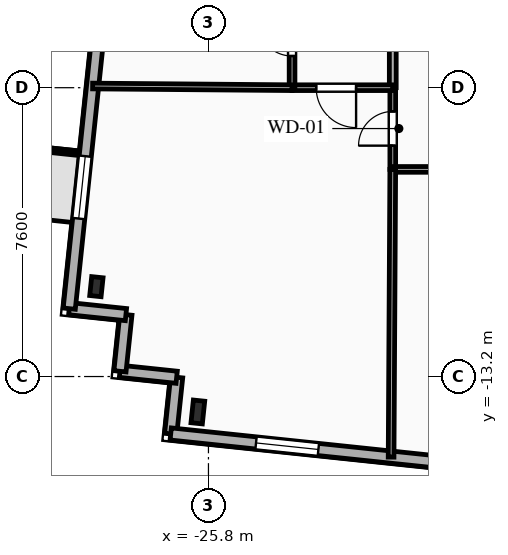
"""IFC4 building model, lengths in metres.
Left out: names, types, materials, properties, quantities, classifications, styles, units other than length and angle.
Written with IfcOpenShell. Run it as: python <this file> out.ifc"""

import sys

from ifc_helpers import new_model, si_unit, direction, frame, frame_2d, origin, origin_2d, place, context, subcontext, project, spatial, rectangle, i_section, extrude, element, fill, save


model = new_model("IFC4")
c1 = context("Model", 3, precision=1e-05, world=origin(), true_north=direction((0.0, 1.0)))
c2 = subcontext(c1, "Body", "Model", "MODEL_VIEW")
j1 = project(units=[si_unit("LENGTHUNIT", "METRE"), si_unit("PLANEANGLEUNIT", "RADIAN")], contexts=[c1])
p1 = place(None, origin())
s1 = spatial("IfcSite", under=j1, at=p1, CompositionType="ELEMENT")
p2 = place(p1, origin())
s2 = spatial("IfcBuilding", under=s1, at=p2, CompositionType="ELEMENT")
p3 = place(p2, frame((0.0, 0.0, 186.35)))
s3 = spatial("IfcBuildingStorey", under=s2, at=p3, CompositionType="ELEMENT", Elevation=186.35)
p4 = place(p3, frame((-26.079, -14.133, 0.0), z_axis=(0.0, 0.0, 1.0), x_axis=(0.994521895368, -0.104528463268, 0.0)))
e1 = element("IfcColumn", 1, at=p4, inside=s3, PredefinedType="COLUMN", context=c2, shape_type="SweptSolid", body=[
    extrude(i_section(OverallWidth=0.3, OverallDepth=0.6, WebThickness=0.015, FlangeThickness=0.03, FilletRadius=0.027, at=origin_2d()), origin(), (0.0, 0.0, 1.0), 3.35),
])
p5 = place(p3, frame((-28.749, -10.835, 0.0), z_axis=(0.0, 0.0, 1.0), x_axis=(0.994521895368, -0.104528463268, 0.0)))
e2 = element("IfcColumn", 2, at=p5, inside=s3, PredefinedType="COLUMN", context=c2, shape_type="SweptSolid", body=[
    extrude(i_section(OverallWidth=0.3, OverallDepth=0.5, WebThickness=0.014, FlangeThickness=0.028, FilletRadius=0.027, at=origin_2d()), origin(), (0.0, 0.0, 1.0), 3.35),
])
for number, where, z_axis, x_axis in (
    (3, (-26.793, -14.711, 0.0), (0.0, 0.0, 1.0), (0.104, 0.995, 0.0)),
    (4, (-26.637, -13.219, 0.0), (0.0, 0.0, 1.0), (-0.995, 0.104, 0.0)),
):
    element("IfcWall", number, at=place(p3, frame(where, z_axis=z_axis, x_axis=x_axis)), inside=s3, PredefinedType="SOLIDWALL", context=c2, shape_type="SweptSolid", body=[
        extrude(rectangle(XDim=1.5, YDim=0.32, at=frame_2d((0.75, 0.0))), origin(), (0.0, 0.0, 1.0), 3.04),
    ])
p6 = place(p3, frame((-28.128, -13.062, 0.0), z_axis=(0.0, 0.0, 1.0), x_axis=(0.104481464157, 0.994526834051, 0.0)))
e5 = element("IfcWall", 5, at=p6, inside=s3, PredefinedType="SOLIDWALL", context=c2, shape_type="SweptSolid", body=[
    extrude(rectangle(XDim=1.5, YDim=0.32, at=frame_2d((0.75, 0.0))), origin(), (0.0, 0.0, 1.0), 3.04),
])
p7 = place(p3, frame((-27.972, -11.571, 0.0), z_axis=(0.0, 0.0, 1.0), x_axis=(-0.994525057048, 0.104498377516, 0.0)))
e6 = element("IfcWall", 6, at=p7, inside=s3, PredefinedType="SOLIDWALL", context=c2, shape_type="SweptSolid", body=[
    extrude(rectangle(XDim=1.5, YDim=0.32, at=frame_2d((0.75, 0.0))), origin(), (0.0, 0.0, 1.0), 3.04),
])
p8 = place(p3, frame((-29.463, -11.414, 0.0), z_axis=(0.0, 0.0, 1.0), x_axis=(0.104530779244, 0.994521651947, 0.0)))
e7 = element("IfcWall", 7, at=p8, inside=s3, PredefinedType="SOLIDWALL", context=c2, shape_type="SweptSolid", body=[
    extrude(rectangle(XDim=28.8, YDim=0.32, at=frame_2d((14.4, 0.0))), origin(), (0.0, 0.0, 1.0), 3.04),
])
p9 = place(p8, frame((2.384, 0.0, 0.85)))
e8 = element("IfcOpeningElement", 8, at=p9, cuts=e7, PredefinedType="OPENING", context=c2, shape_type="SweptSolid", body=[
    extrude(rectangle(XDim=1.65, YDim=1.85, at=frame_2d((0.825, 0.925))), frame((0.0, 0.17, 0.0), z_axis=(0.0, -1.0, 0.0), x_axis=(1.0, 0.0, 0.0)), (0.0, 0.0, 1.0), 0.34),
])
p10 = place(p8, frame((8.973, 0.0, 0.85)))
e9 = element("IfcOpeningElement", 9, at=p10, cuts=e7, PredefinedType="OPENING", context=c2, shape_type="SweptSolid", body=[
    extrude(rectangle(XDim=1.95, YDim=1.85, at=frame_2d((0.975, 0.925))), frame((0.0, 0.17, 0.0), z_axis=(0.0, -1.0, 0.0), x_axis=(1.0, 0.0, 0.0)), (0.0, 0.0, 1.0), 0.34),
])
p11 = place(p8, frame((12.286, 0.0, 0.85)))
e10 = element("IfcOpeningElement", 10, at=p11, cuts=e7, PredefinedType="OPENING", context=c2, shape_type="SweptSolid", body=[
    extrude(rectangle(XDim=1.5, YDim=1.85, at=frame_2d((0.75, 0.925))), frame((0.0, 0.17, 0.0), z_axis=(0.0, -1.0, 0.0), x_axis=(1.0, 0.0, 0.0)), (0.0, 0.0, 1.0), 0.34),
])
p12 = place(p8, frame((15.094, 0.0, 0.85)))
e11 = element("IfcOpeningElement", 11, at=p12, cuts=e7, PredefinedType="OPENING", context=c2, shape_type="SweptSolid", body=[
    extrude(rectangle(XDim=1.5, YDim=1.85, at=frame_2d((0.75, 0.925))), frame((0.0, 0.17, 0.0), z_axis=(0.0, -1.0, 0.0), x_axis=(1.0, 0.0, 0.0)), (0.0, 0.0, 1.0), 0.34),
])
p13 = place(p8, frame((17.942, 0.0, 0.85)))
e12 = element("IfcOpeningElement", 12, at=p13, cuts=e7, PredefinedType="OPENING", context=c2, shape_type="SweptSolid", body=[
    extrude(rectangle(XDim=1.5, YDim=1.85, at=frame_2d((0.75, 0.925))), frame((0.0, 0.17, 0.0), z_axis=(0.0, -1.0, 0.0), x_axis=(1.0, 0.0, 0.0)), (0.0, 0.0, 1.0), 0.34),
])
p14 = place(p8, frame((23.442, 0.0, 0.85)))
e13 = element("IfcOpeningElement", 13, at=p14, cuts=e7, PredefinedType="OPENING", context=c2, shape_type="SweptSolid", body=[
    extrude(rectangle(XDim=1.65, YDim=1.85, at=frame_2d((0.825, 0.925))), frame((0.0, 0.17, 0.0), z_axis=(0.0, -1.0, 0.0), x_axis=(1.0, 0.0, 0.0)), (0.0, 0.0, 1.0), 0.34),
])
p15 = place(p3, frame((18.756, -19.498, 0.0), z_axis=(0.0, 0.0, 1.0), x_axis=(-0.994522060044, 0.104526896475, 0.0)))
e14 = element("IfcWall", 14, at=p15, inside=s3, PredefinedType="SOLIDWALL", context=c2, shape_type="SweptSolid", body=[
    extrude(rectangle(XDim=45.8, YDim=0.32, at=frame_2d((22.9, 0.0))), origin(), (0.0, 0.0, 1.0), 3.04),
])
p16 = place(p15, frame((1.217, 0.0, 0.85)))
e15 = element("IfcOpeningElement", 15, at=p16, cuts=e14, PredefinedType="OPENING", context=c2, shape_type="SweptSolid", body=[
    extrude(rectangle(XDim=1.65, YDim=1.85, at=frame_2d((0.825, 0.925))), frame((0.0, 0.17, 0.0), z_axis=(0.0, -1.0, 0.0), x_axis=(1.0, 0.0, 0.0)), (0.0, 0.0, 1.0), 0.34),
])
p17 = place(p15, frame((5.621, 0.0, 0.85)))
e16 = element("IfcOpeningElement", 16, at=p17, cuts=e14, PredefinedType="OPENING", context=c2, shape_type="SweptSolid", body=[
    extrude(rectangle(XDim=1.65, YDim=1.85, at=frame_2d((0.825, 0.925))), frame((0.0, 0.17, 0.0), z_axis=(0.0, -1.0, 0.0), x_axis=(1.0, 0.0, 0.0)), (0.0, 0.0, 1.0), 0.34),
])
p18 = place(p15, frame((13.433, 0.0, 0.85)))
e17 = element("IfcOpeningElement", 17, at=p18, cuts=e14, PredefinedType="OPENING", context=c2, shape_type="SweptSolid", body=[
    extrude(rectangle(XDim=2.2, YDim=1.85, at=frame_2d((1.1, 0.925))), frame((0.0, 0.17, 0.0), z_axis=(0.0, -1.0, 0.0), x_axis=(1.0, 0.0, 0.0)), (0.0, 0.0, 1.0), 0.34),
])
p19 = place(p15, frame((23.962, 0.0, 0.85)))
e18 = element("IfcOpeningElement", 18, at=p19, cuts=e14, PredefinedType="OPENING", context=c2, shape_type="SweptSolid", body=[
    extrude(rectangle(XDim=2.2, YDim=1.85, at=frame_2d((1.1, 0.925))), frame((0.0, 0.17, 0.0), z_axis=(0.0, -1.0, 0.0), x_axis=(1.0, 0.0, 0.0)), (0.0, 0.0, 1.0), 0.34),
])
p20 = place(p15, frame((34.366, 0.0, 0.85)))
e19 = element("IfcOpeningElement", 19, at=p20, cuts=e14, PredefinedType="OPENING", context=c2, shape_type="SweptSolid", body=[
    extrude(rectangle(XDim=1.65, YDim=1.85, at=frame_2d((0.825, 0.925))), frame((0.0, 0.17, 0.0), z_axis=(0.0, -1.0, 0.0), x_axis=(1.0, 0.0, 0.0)), (0.0, 0.0, 1.0), 0.34),
])
p21 = place(p15, frame((41.892, 0.0, 0.85)))
e20 = element("IfcOpeningElement", 20, at=p21, cuts=e14, PredefinedType="OPENING", context=c2, shape_type="SweptSolid", body=[
    extrude(rectangle(XDim=1.65, YDim=1.85, at=frame_2d((0.825, 0.925))), frame((0.0, 0.17, 0.0), z_axis=(0.0, -1.0, 0.0), x_axis=(1.0, 0.0, 0.0)), (0.0, 0.0, 1.0), 0.34),
])
p22 = place(p3, frame((-20.95, -7.75, 0.0), z_axis=(0.0, 0.0, 1.0), x_axis=(0.0, 1.0, 0.0)))
e21 = element("IfcWall", 21, at=p22, inside=s3, PredefinedType="PARTITIONING", context=c2, shape_type="SweptSolid", body=[
    extrude(rectangle(XDim=2.15, YDim=0.15, at=frame_2d((1.075, 0.0))), origin(), (0.0, 0.0, 1.0), 3.04),
])
p23 = place(p22, frame((0.625, 0.0, 0.0)))
e22 = element("IfcOpeningElement", 22, at=p23, cuts=e21, PredefinedType="OPENING", context=c2, shape_type="SweptSolid", body=[
    extrude(rectangle(XDim=0.9, YDim=2.1, at=frame_2d((0.45, 1.05))), frame((0.0, 0.085, 0.0), z_axis=(0.0, -1.0, 0.0), x_axis=(1.0, 0.0, 0.0)), (0.0, 0.0, 1.0), 0.17),
])
p24 = place(p3, frame((-11.325, -7.75, 0.0), z_axis=(0.0, 0.0, 1.0), x_axis=(-1.0, 0.0, 0.0)))
e23 = element("IfcWall", 23, at=p24, inside=s3, PredefinedType="PARTITIONING", context=c2, shape_type="SweptSolid", body=[
    extrude(rectangle(XDim=9.625, YDim=0.15, at=frame_2d((4.812, 0.0))), origin(), (0.0, 0.0, 1.0), 3.04),
])
p25 = place(p24, frame((2.434, 0.0, 0.0)))
e24 = element("IfcOpeningElement", 24, at=p25, cuts=e23, PredefinedType="OPENING", context=c2, shape_type="SweptSolid", body=[
    extrude(rectangle(XDim=1.05, YDim=2.15, at=frame_2d((0.525, 1.075))), frame((0.0, 0.085, 0.0), z_axis=(0.0, -1.0, 0.0), x_axis=(1.0, 0.0, 0.0)), (0.0, 0.0, 1.0), 0.17),
])
p26 = place(p3, frame((-20.95, -5.6, 0.0), z_axis=(0.0, 0.0, 1.0), x_axis=(0.0, 1.0, 0.0)))
e25 = element("IfcWall", 25, at=p26, inside=s3, PredefinedType="PARTITIONING", context=c2, shape_type="SweptSolid", body=[
    extrude(rectangle(XDim=14.1, YDim=0.18, at=frame_2d((7.05, 0.0))), origin(), (0.0, 0.0, 1.0), 3.04),
])
p27 = place(p26, frame((5.058, 0.0, 0.0)))
e26 = element("IfcOpeningElement", 26, at=p27, cuts=e25, PredefinedType="OPENING", context=c2, shape_type="SweptSolid", body=[
    extrude(rectangle(XDim=1.0, YDim=2.15, at=frame_2d((0.5, 1.075))), frame((0.0, 0.1, 0.0), z_axis=(0.0, -1.0, 0.0), x_axis=(1.0, 0.0, 0.0)), (0.0, 0.0, 1.0), 0.2),
])
p28 = place(p3, frame((-20.95, -5.6, 0.0), z_axis=(0.0, 0.0, 1.0), x_axis=(-1.0, 0.0, 0.0)))
e27 = element("IfcWall", 27, at=p28, inside=s3, PredefinedType="PARTITIONING", context=c2, shape_type="SweptSolid", body=[
    extrude(rectangle(XDim=2.65, YDim=0.15, at=frame_2d((1.325, 0.0))), origin(), (0.0, 0.0, 1.0), 3.04),
])
p29 = place(p28, frame((0.965, 0.0, 0.0)))
e28 = element("IfcOpeningElement", 28, at=p29, cuts=e27, PredefinedType="OPENING", context=c2, shape_type="SweptSolid", body=[
    extrude(rectangle(XDim=1.05, YDim=2.15, at=frame_2d((0.525, 1.075))), frame((0.0, 0.085, 0.0), z_axis=(0.0, -1.0, 0.0), x_axis=(1.0, 0.0, 0.0)), (0.0, 0.0, 1.0), 0.17),
])
p30 = place(p3, frame((-23.6, -5.6, 0.0), z_axis=(0.0, 0.0, 1.0), x_axis=(0.0, 1.0, 0.0)))
e29 = element("IfcWall", 29, at=p30, inside=s3, PredefinedType="PLUMBINGWALL", context=c2, shape_type="SweptSolid", body=[
    extrude(rectangle(XDim=2.35, YDim=0.15, at=frame_2d((1.175, 0.0))), origin(), (0.0, 0.0, 1.0), 2.695),
])
p31 = place(p30, frame((0.834, 0.0, 0.0)))
e30 = element("IfcOpeningElement", 30, at=p31, cuts=e29, PredefinedType="OPENING", context=c2, shape_type="SweptSolid", body=[
    extrude(rectangle(XDim=0.9, YDim=2.1, at=frame_2d((0.45, 1.05))), frame((0.0, 0.085, 0.0), z_axis=(0.0, -1.0, 0.0), x_axis=(1.0, 0.0, 0.0)), (0.0, 0.0, 1.0), 0.17),
])
p32 = place(p3, frame((-28.848, -5.556, 0.0), z_axis=(0.0, 0.0, 1.0), x_axis=(0.999964936305, -0.008374136435, 0.0)))
e31 = element("IfcWall", 31, at=p32, inside=s3, PredefinedType="PLUMBINGWALL", context=c2, shape_type="SweptSolid", body=[
    extrude(rectangle(XDim=5.248, YDim=0.15, at=frame_2d((2.624, 0.0))), origin(), (0.0, 0.0, 1.0), 3.04),
])
p33 = place(p3, frame((-20.95, -7.75, 0.0), z_axis=(0.0, 0.0, 1.0), x_axis=(-0.005804668564, -0.99998315277, 0.0)))
e32 = element("IfcWall", 32, at=p33, inside=s3, PredefinedType="PARTITIONING", context=c2, shape_type="SweptSolid", body=[
    extrude(rectangle(XDim=7.571, YDim=0.15, at=frame_2d((3.785, 0.0))), origin(), (0.0, 0.0, 1.0), 3.04),
])
p34 = place(p9, origin())
e33 = element("IfcWindow", 33, at=p34, inside=s3, PartitioningType="SINGLE_PANEL", PredefinedType="WINDOW", context=c2, shape_type="SweptSolid", body=[
    extrude(rectangle(XDim=1.65, YDim=1.85, at=frame_2d((0.825, 0.925))), frame((0.0, 0.03, 0.0), z_axis=(0.0, -1.0, 0.0), x_axis=(1.0, 0.0, 0.0)), (0.0, 0.0, 1.0), 0.06),
])
fill(e8, e33)
p35 = place(p21, origin())
e34 = element("IfcWindow", 34, at=p35, inside=s3, PartitioningType="SINGLE_PANEL", PredefinedType="WINDOW", context=c2, shape_type="SweptSolid", body=[
    extrude(rectangle(XDim=1.65, YDim=1.85, at=frame_2d((0.825, 0.925))), frame((0.0, 0.03, 0.0), z_axis=(0.0, -1.0, 0.0), x_axis=(1.0, 0.0, 0.0)), (0.0, 0.0, 1.0), 0.06),
])
fill(e20, e34)
p36 = place(p23, origin())
e35 = element("IfcDoor", 35, at=p36, inside=s3, OperationType="SINGLE_SWING_LEFT", PredefinedType="DOOR", context=c2, shape_type="SweptSolid", body=[
    extrude(rectangle(XDim=0.9, YDim=2.1, at=frame_2d((0.45, 1.05))), frame((0.0, 0.025, 0.0), z_axis=(0.0, -1.0, 0.0), x_axis=(1.0, 0.0, 0.0)), (0.0, 0.0, 1.0), 0.05),
])
fill(e22, e35)
p37 = place(p29, origin())
e36 = element("IfcDoor", 36, at=p37, inside=s3, OperationType="SINGLE_SWING_LEFT", PredefinedType="DOOR", context=c2, shape_type="SweptSolid", body=[
    extrude(rectangle(XDim=1.05, YDim=2.15, at=frame_2d((0.525, 1.075))), frame((0.0, 0.025, 0.0), z_axis=(0.0, -1.0, 0.0), x_axis=(1.0, 0.0, 0.0)), (0.0, 0.0, 1.0), 0.05),
])
fill(e28, e36)
p38 = place(p31, origin())
e37 = element("IfcDoor", 37, at=p38, inside=s3, OperationType="SINGLE_SWING_RIGHT", PredefinedType="DOOR", context=c2, shape_type="SweptSolid", body=[
    extrude(rectangle(XDim=0.9, YDim=2.1, at=frame_2d((0.45, 1.05))), frame((0.0, 0.025, 0.0), z_axis=(0.0, -1.0, 0.0), x_axis=(1.0, 0.0, 0.0)), (0.0, 0.0, 1.0), 0.05),
])
fill(e30, e37)
save(model, sys.argv[1])
